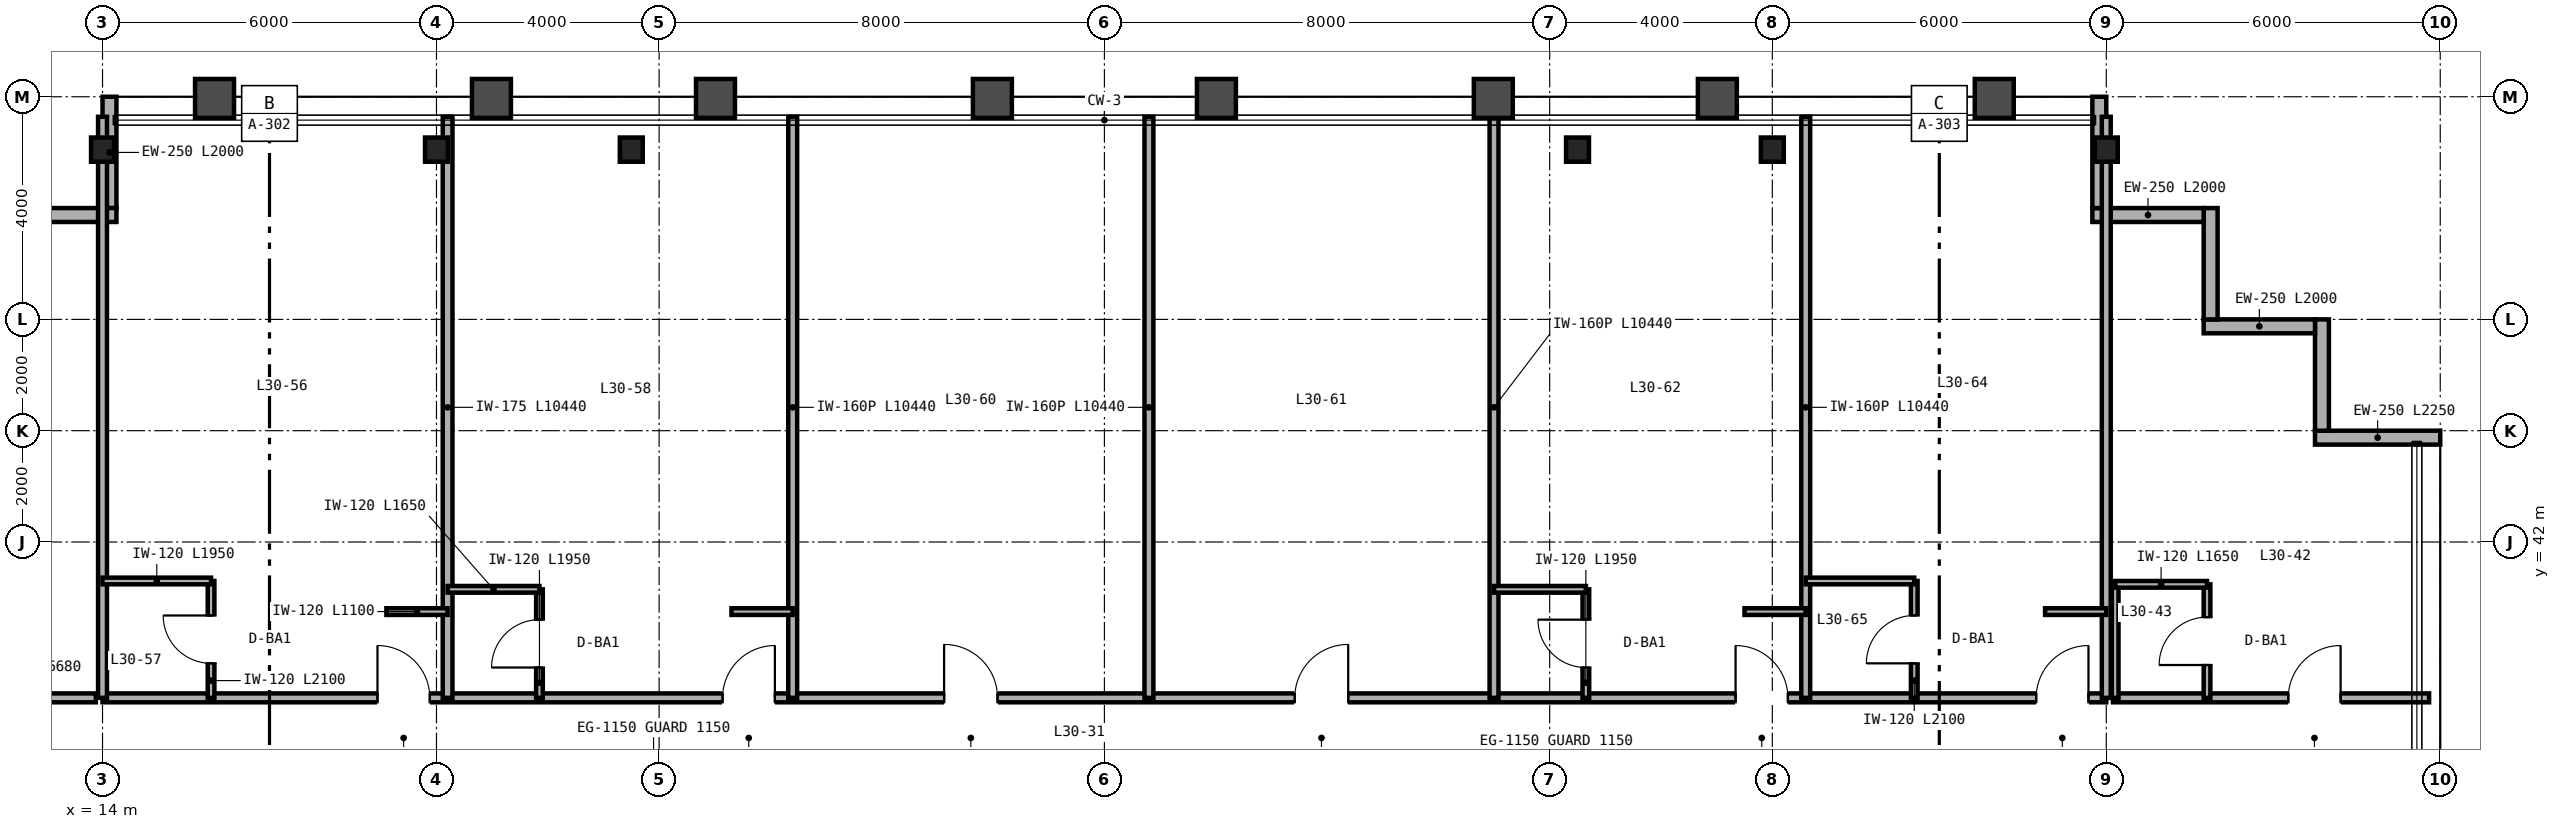
"""IFC4 building model, lengths in metres.
Left out: names, types, materials, properties, quantities, classifications, styles, units other than length and angle.
Written with IfcOpenShell. Run it as: python <this file> out.ifc"""

import sys

from ifc_helpers import new_model, si_unit, direction, frame, frame_2d, origin, origin_2d, place, context, subcontext, project, spatial, rectangle, i_section, extrude, source, transform, mapped, element, fill, save


model = new_model("IFC4")
c1 = context("Model", 3, precision=1e-05, world=origin(), true_north=direction((0.0, 1.0)))
c2 = subcontext(c1, "Body", "Model", "MODEL_VIEW")
j1 = project(units=[si_unit("LENGTHUNIT", "METRE"), si_unit("PLANEANGLEUNIT", "RADIAN")], contexts=[c1])
p1 = place(None, origin())
s1 = spatial("IfcSite", under=j1, at=p1, CompositionType="ELEMENT")
p2 = place(p1, origin())
s2 = spatial("IfcBuilding", under=s1, at=p2, CompositionType="ELEMENT")
p3 = place(p2, frame((0.0, 0.0, 122.4)))
s3 = spatial("IfcBuildingStorey", under=s2, at=p3, CompositionType="ELEMENT", Elevation=122.4)
m1 = source(origin(), c2, "Body", "SweptSolid", [
    extrude(i_section(OverallWidth=0.412, OverallDepth=0.435, WebThickness=0.036, FlangeThickness=0.057, FilletRadius=0.025, at=origin_2d()), origin(), (0.0, 0.0, 1.0), 3.36),
])
for number, where, z_axis, x_axis in (
    (1, (14.0, 49.05, 0.0), (0.0, 0.0, 1.0), (1.0, 0.0, 0.0)),
    (2, (20.0, 49.05, 0.0), (0.0, 0.0, 1.0), (1.0, 0.0, 0.0)),
    (3, (23.5, 49.05, 0.0), (0.0, 0.0, 1.0), (1.0, 0.0, 0.0)),
    (4, (40.5, 49.05, 0.0), (0.0, 0.0, 1.0), (1.0, 0.0, 0.0)),
    (5, (44.0, 49.05, 0.0), (0.0, 0.0, 1.0), (1.0, 0.0, 0.0)),
    (6, (50.0, 49.05, 0.0), (0.0, 0.0, 1.0), (1.0, 0.0, 0.0)),
):
    element("IfcColumn", number, at=place(p3, frame(where, z_axis=z_axis, x_axis=x_axis)), inside=s3, PredefinedType="COLUMN", context=c2, shape_type="MappedRepresentation", body=[
        mapped(m1, transform((0.0, 0.0, 0.0), scale=1.0)),
    ])
p4 = place(p3, frame((56.0, 43.875, 0.0), z_axis=(0.0, 0.0, 1.0), x_axis=(-1.0, 0.0, 0.0)))
e7 = element("IfcWall", 7, at=p4, inside=s3, PredefinedType="SOLIDWALL", context=c2, shape_type="SweptSolid", body=[
    extrude(rectangle(XDim=2.25, YDim=0.25, at=frame_2d((1.125, 0.0))), origin(), (0.0, 0.0, 1.0), 3.36),
])
for number, where, z_axis, x_axis in (
    (8, (53.875, 44.0, 0.0), (0.0, 0.0, 1.0), (0.0, 1.0, 0.0)),
    (9, (53.75, 45.875, 0.0), (0.0, 0.0, 1.0), (-1.0, 0.0, 0.0)),
    (10, (51.875, 46.0, 0.0), (0.0, 0.0, 1.0), (0.0, 1.0, 0.0)),
    (11, (51.75, 47.875, 0.0), (0.0, 0.0, 1.0), (-1.0, 0.0, 0.0)),
):
    element("IfcWall", number, at=place(p3, frame(where, z_axis=z_axis, x_axis=x_axis)), inside=s3, PredefinedType="SOLIDWALL", context=c2, shape_type="SweptSolid", body=[
        extrude(rectangle(XDim=2.0, YDim=0.25, at=frame_2d((1.0, 0.0))), origin(), (0.0, 0.0, 1.0), 3.36),
    ])
for number, where, z_axis, x_axis in (
    (12, (49.875, 48.0, 0.0), (0.0, 0.0, 1.0), (0.0, 1.0, 0.0)),
    (13, (14.125, 50.0, 0.0), (0.0, 0.0, 1.0), (0.0, -1.0, 0.0)),
):
    element("IfcWall", number, at=place(p3, frame(where, z_axis=z_axis, x_axis=x_axis)), inside=s3, PredefinedType="SOLIDWALL", context=c2, shape_type="SweptSolid", body=[
        extrude(rectangle(XDim=2.0, YDim=0.25, at=frame_2d((1.0, 0.0))), origin(), (0.0, 0.0, 1.0), 2.667),
    ])
p5 = place(p3, frame((14.25, 47.875, 0.0), z_axis=(0.0, 0.0, 1.0), x_axis=(-1.0, 0.0, 0.0)))
e14 = element("IfcWall", 14, at=p5, inside=s3, PredefinedType="SOLIDWALL", context=c2, shape_type="SweptSolid", body=[
    extrude(rectangle(XDim=2.0, YDim=0.25, at=frame_2d((1.0, 0.0))), origin(), (0.0, 0.0, 1.0), 3.36),
])
p6 = place(p3, frame((8.2, 39.2, 0.0), z_axis=(0.0, 0.0, 1.0), x_axis=(1.0, 0.0, 0.0)))
e15 = element("IfcWall", 15, at=p6, inside=s3, PredefinedType="PARTITIONING", context=c2, shape_type="SweptSolid", body=[
    extrude(rectangle(XDim=5.68, YDim=0.16, at=frame_2d((2.84, 0.0))), origin(), (0.0, 0.0, 1.0), 3.36),
])
p7 = place(p6, frame((2.36, 0.0, 0.0)))
e16 = element("IfcOpeningElement", 16, at=p7, cuts=e15, PredefinedType="OPENING", context=c2, shape_type="SweptSolid", body=[
    extrude(rectangle(XDim=0.96, YDim=2.15, at=frame_2d((0.48, 1.075))), frame((0.0, 0.09, 0.0), z_axis=(0.0, -1.0, 0.0), x_axis=(1.0, 0.0, 0.0)), (0.0, 0.0, 1.0), 0.18),
])
p8 = place(p3, frame((50.12, 39.2, 0.0), z_axis=(0.0, 0.0, 1.0), x_axis=(1.0, 0.0, 0.0)))
e17 = element("IfcWall", 17, at=p8, inside=s3, PredefinedType="PARTITIONING", context=c2, shape_type="SweptSolid", body=[
    extrude(rectangle(XDim=5.68, YDim=0.16, at=frame_2d((2.84, 0.0))), origin(), (0.0, 0.0, 1.0), 3.36),
])
p9 = place(p8, frame((3.15, 0.0, 0.0)))
e18 = element("IfcOpeningElement", 18, at=p9, cuts=e17, PredefinedType="OPENING", context=c2, shape_type="SweptSolid", body=[
    extrude(rectangle(XDim=0.94, YDim=2.15, at=frame_2d((0.47, 1.075))), frame((0.0, 0.09, 0.0), z_axis=(0.0, -1.0, 0.0), x_axis=(1.0, 0.0, 0.0)), (0.0, 0.0, 1.0), 0.18),
])
p10 = place(p3, frame((51.81, 39.2, 0.0), z_axis=(0.0, 0.0, 1.0), x_axis=(0.0, 1.0, 0.0)))
e19 = element("IfcWall", 19, at=p10, inside=s3, PredefinedType="PARTITIONING", context=c2, shape_type="SweptSolid", body=[
    extrude(rectangle(XDim=2.04, YDim=0.12, at=frame_2d((1.02, 0.0))), origin(), (0.0, 0.0, 1.0), 3.36),
])
p11 = place(p10, frame((0.59, 0.0, 0.0)))
e20 = element("IfcOpeningElement", 20, at=p11, cuts=e19, PredefinedType="OPENING", context=c2, shape_type="SweptSolid", body=[
    extrude(rectangle(XDim=0.86, YDim=2.1, at=frame_2d((0.43, 1.05))), frame((0.0, 0.07, 0.0), z_axis=(0.0, -1.0, 0.0), x_axis=(1.0, 0.0, 0.0)), (0.0, 0.0, 1.0), 0.14),
])
p12 = place(p3, frame((50.16, 39.2, 0.0), z_axis=(0.0, 0.0, 1.0), x_axis=(0.0, 1.0, 0.0)))
e21 = element("IfcWall", 21, at=p12, inside=s3, PredefinedType="PARTITIONING", context=c2, shape_type="SweptSolid", body=[
    extrude(rectangle(XDim=2.04, YDim=0.12, at=frame_2d((1.02, 0.0))), origin(), (0.0, 0.0, 1.0), 3.36),
])
p13 = place(p3, frame((50.16, 41.24, 0.0), z_axis=(0.0, 0.0, 1.0), x_axis=(1.0, 0.0, 0.0)))
e22 = element("IfcWall", 22, at=p13, inside=s3, PredefinedType="PARTITIONING", context=c2, shape_type="SweptSolid", body=[
    extrude(rectangle(XDim=1.65, YDim=0.12, at=frame_2d((0.825, 0.0))), origin(), (0.0, 0.0, 1.0), 3.36),
])
p14 = place(p3, frame((14.0, 39.2, 0.0), z_axis=(0.0, 0.0, 1.0), x_axis=(1.0, 0.0, 0.0)))
e23 = element("IfcWall", 23, at=p14, inside=s3, PredefinedType="PARTITIONING", context=c2, shape_type="SweptSolid", body=[
    extrude(rectangle(XDim=36.0, YDim=0.16, at=frame_2d((18.0, 0.0))), origin(), (0.0, 0.0, 1.0), 2.581),
])
p15 = place(p14, frame((4.94, 0.0, 0.0)))
e24 = element("IfcOpeningElement", 24, at=p15, cuts=e23, PredefinedType="OPENING", context=c2, shape_type="SweptSolid", body=[
    extrude(rectangle(XDim=0.94, YDim=2.15, at=frame_2d((0.47, 1.075))), frame((0.0, 0.09, 0.0), z_axis=(0.0, -1.0, 0.0), x_axis=(1.0, 0.0, 0.0)), (0.0, 0.0, 1.0), 0.18),
])
p16 = place(p14, frame((11.14, 0.0, 0.0)))
e25 = element("IfcOpeningElement", 25, at=p16, cuts=e23, PredefinedType="OPENING", context=c2, shape_type="SweptSolid", body=[
    extrude(rectangle(XDim=0.94, YDim=2.15, at=frame_2d((0.47, 1.075))), frame((0.0, 0.09, 0.0), z_axis=(0.0, -1.0, 0.0), x_axis=(1.0, 0.0, 0.0)), (0.0, 0.0, 1.0), 0.18),
])
p17 = place(p14, frame((15.12, 0.0, 0.0)))
e26 = element("IfcOpeningElement", 26, at=p17, cuts=e23, PredefinedType="OPENING", context=c2, shape_type="SweptSolid", body=[
    extrude(rectangle(XDim=0.96, YDim=2.15, at=frame_2d((0.48, 1.075))), frame((0.0, 0.09, 0.0), z_axis=(0.0, -1.0, 0.0), x_axis=(1.0, 0.0, 0.0)), (0.0, 0.0, 1.0), 0.18),
])
p18 = place(p14, frame((21.42, 0.0, 0.0)))
e27 = element("IfcOpeningElement", 27, at=p18, cuts=e23, PredefinedType="OPENING", context=c2, shape_type="SweptSolid", body=[
    extrude(rectangle(XDim=0.96, YDim=2.15, at=frame_2d((0.48, 1.075))), frame((0.0, 0.09, 0.0), z_axis=(0.0, -1.0, 0.0), x_axis=(1.0, 0.0, 0.0)), (0.0, 0.0, 1.0), 0.18),
])
p19 = place(p14, frame((29.34, 0.0, 0.0)))
e28 = element("IfcOpeningElement", 28, at=p19, cuts=e23, PredefinedType="OPENING", context=c2, shape_type="SweptSolid", body=[
    extrude(rectangle(XDim=0.94, YDim=2.15, at=frame_2d((0.47, 1.075))), frame((0.0, 0.09, 0.0), z_axis=(0.0, -1.0, 0.0), x_axis=(1.0, 0.0, 0.0)), (0.0, 0.0, 1.0), 0.18),
])
p20 = place(p14, frame((34.74, 0.0, 0.0)))
e29 = element("IfcOpeningElement", 29, at=p20, cuts=e23, PredefinedType="OPENING", context=c2, shape_type="SweptSolid", body=[
    extrude(rectangle(XDim=0.94, YDim=2.15, at=frame_2d((0.47, 1.075))), frame((0.0, 0.09, 0.0), z_axis=(0.0, -1.0, 0.0), x_axis=(1.0, 0.0, 0.0)), (0.0, 0.0, 1.0), 0.18),
])
for number, where, z_axis, x_axis in (
    (30, (14.0, 39.2, 0.0), (0.0, 0.0, 1.0), (0.0, 1.0, 0.0)),
    (31, (50.0, 39.2, 0.0), (0.0, 0.0, 1.0), (0.0, 1.0, 0.0)),
):
    element("IfcWall", number, at=place(p3, frame(where, z_axis=z_axis, x_axis=x_axis)), inside=s3, PredefinedType="PARTITIONING", context=c2, shape_type="SweptSolid", body=[
        extrude(rectangle(XDim=10.44, YDim=0.16, at=frame_2d((5.22, 0.0))), origin(), (0.0, 0.0, 1.0), 2.667),
    ])
p21 = place(p3, frame((20.2, 39.2, 0.0), z_axis=(0.0, 0.0, 1.0), x_axis=(0.0, 1.0, 0.0)))
e32 = element("IfcWall", 32, at=p21, inside=s3, PredefinedType="PARTITIONING", context=c2, shape_type="SweptSolid", body=[
    extrude(rectangle(XDim=10.44, YDim=0.175, at=frame_2d((5.22, 0.0))), origin(), (0.0, 0.0, 1.0), 2.667),
])
p22 = place(p3, frame((15.95, 39.2, 0.0), z_axis=(0.0, 0.0, 1.0), x_axis=(0.0, 1.0, 0.0)))
e33 = element("IfcWall", 33, at=p22, inside=s3, PredefinedType="PARTITIONING", context=c2, shape_type="SweptSolid", body=[
    extrude(rectangle(XDim=2.1, YDim=0.12, at=frame_2d((1.05, 0.0))), origin(), (0.0, 0.0, 1.0), 3.36),
])
p23 = place(p22, frame((0.62, 0.0, 0.0)))
e34 = element("IfcOpeningElement", 34, at=p23, cuts=e33, PredefinedType="OPENING", context=c2, shape_type="SweptSolid", body=[
    extrude(rectangle(XDim=0.86, YDim=2.1, at=frame_2d((0.43, 1.05))), frame((0.0, 0.07, 0.0), z_axis=(0.0, -1.0, 0.0), x_axis=(1.0, 0.0, 0.0)), (0.0, 0.0, 1.0), 0.14),
])
p24 = place(p3, frame((14.0, 41.3, 0.0), z_axis=(0.0, 0.0, 1.0), x_axis=(1.0, 0.0, 0.0)))
e35 = element("IfcWall", 35, at=p24, inside=s3, PredefinedType="PARTITIONING", context=c2, shape_type="SweptSolid", body=[
    extrude(rectangle(XDim=1.95, YDim=0.12, at=frame_2d((0.975, 0.0))), origin(), (0.0, 0.0, 1.0), 3.36),
])
p25 = place(p3, frame((19.1, 40.75, 0.0), z_axis=(0.0, 0.0, 1.0), x_axis=(1.0, 0.0, 0.0)))
e36 = element("IfcWall", 36, at=p25, inside=s3, PredefinedType="PARTITIONING", context=c2, shape_type="SweptSolid", body=[
    extrude(rectangle(XDim=1.1, YDim=0.12, at=frame_2d((0.55, 0.0))), origin(), (0.0, 0.0, 1.0), 3.36),
])
p26 = place(p3, frame((26.4, 39.2, 0.0), z_axis=(0.0, 0.0, 1.0), x_axis=(0.0, 1.0, 0.0)))
e37 = element("IfcWall", 37, at=p26, inside=s3, PredefinedType="PARTITIONING", context=c2, shape_type="SweptSolid", body=[
    extrude(rectangle(XDim=10.44, YDim=0.16, at=frame_2d((5.22, 0.0))), origin(), (0.0, 0.0, 1.0), 2.433),
])
p27 = place(p3, frame((21.85, 39.2, 0.0), z_axis=(0.0, 0.0, 1.0), x_axis=(0.0, 1.0, 0.0)))
e38 = element("IfcWall", 38, at=p27, inside=s3, PredefinedType="PARTITIONING", context=c2, shape_type="SweptSolid", body=[
    extrude(rectangle(XDim=1.95, YDim=0.12, at=frame_2d((0.975, 0.0))), origin(), (0.0, 0.0, 1.0), 3.36),
])
p28 = place(p27, frame((0.545, 0.0, 0.0)))
e39 = element("IfcOpeningElement", 39, at=p28, cuts=e38, PredefinedType="OPENING", context=c2, shape_type="SweptSolid", body=[
    extrude(rectangle(XDim=0.86, YDim=2.1, at=frame_2d((0.43, 1.05))), frame((0.0, 0.07, 0.0), z_axis=(0.0, -1.0, 0.0), x_axis=(1.0, 0.0, 0.0)), (0.0, 0.0, 1.0), 0.14),
])
p29 = place(p3, frame((20.2, 41.15, 0.0), z_axis=(0.0, 0.0, 1.0), x_axis=(1.0, 0.0, 0.0)))
e40 = element("IfcWall", 40, at=p29, inside=s3, PredefinedType="PARTITIONING", context=c2, shape_type="SweptSolid", body=[
    extrude(rectangle(XDim=1.65, YDim=0.12, at=frame_2d((0.825, 0.0))), origin(), (0.0, 0.0, 1.0), 3.36),
])
p30 = place(p3, frame((25.3, 40.75, 0.0), z_axis=(0.0, 0.0, 1.0), x_axis=(1.0, 0.0, 0.0)))
e41 = element("IfcWall", 41, at=p30, inside=s3, PredefinedType="PARTITIONING", context=c2, shape_type="SweptSolid", body=[
    extrude(rectangle(XDim=1.1, YDim=0.12, at=frame_2d((0.55, 0.0))), origin(), (0.0, 0.0, 1.0), 3.36),
])
for number, where, z_axis, x_axis in (
    (42, (32.8, 39.2, 0.0), (0.0, 0.0, 1.0), (0.0, 1.0, 0.0)),
    (43, (39.0, 39.2, 0.0), (0.0, 0.0, 1.0), (0.0, 1.0, 0.0)),
):
    element("IfcWall", number, at=place(p3, frame(where, z_axis=z_axis, x_axis=x_axis)), inside=s3, PredefinedType="PARTITIONING", context=c2, shape_type="SweptSolid", body=[
        extrude(rectangle(XDim=10.44, YDim=0.16, at=frame_2d((5.22, 0.0))), origin(), (0.0, 0.0, 1.0), 2.433),
    ])
p31 = place(p3, frame((44.6, 39.2, 0.0), z_axis=(0.0, 0.0, 1.0), x_axis=(0.0, 1.0, 0.0)))
e44 = element("IfcWall", 44, at=p31, inside=s3, PredefinedType="PARTITIONING", context=c2, shape_type="SweptSolid", body=[
    extrude(rectangle(XDim=10.44, YDim=0.16, at=frame_2d((5.22, 0.0))), origin(), (0.0, 0.0, 1.0), 2.667),
])
p32 = place(p3, frame((40.65, 39.2, 0.0), z_axis=(0.0, 0.0, 1.0), x_axis=(0.0, 1.0, 0.0)))
e45 = element("IfcWall", 45, at=p32, inside=s3, PredefinedType="PARTITIONING", context=c2, shape_type="SweptSolid", body=[
    extrude(rectangle(XDim=1.95, YDim=0.12, at=frame_2d((0.975, 0.0))), origin(), (0.0, 0.0, 1.0), 2.581),
])
p33 = place(p32, frame((0.545, 0.0, 0.0)))
e46 = element("IfcOpeningElement", 46, at=p33, cuts=e45, PredefinedType="OPENING", context=c2, shape_type="SweptSolid", body=[
    extrude(rectangle(XDim=0.86, YDim=2.1, at=frame_2d((0.43, 1.05))), frame((0.0, 0.07, 0.0), z_axis=(0.0, -1.0, 0.0), x_axis=(1.0, 0.0, 0.0)), (0.0, 0.0, 1.0), 0.14),
])
p34 = place(p3, frame((39.0, 41.15, 0.0), z_axis=(0.0, 0.0, 1.0), x_axis=(1.0, 0.0, 0.0)))
e47 = element("IfcWall", 47, at=p34, inside=s3, PredefinedType="PARTITIONING", context=c2, shape_type="SweptSolid", body=[
    extrude(rectangle(XDim=1.65, YDim=0.12, at=frame_2d((0.825, 0.0))), origin(), (0.0, 0.0, 1.0), 2.581),
])
p35 = place(p3, frame((43.5, 40.75, 0.0), z_axis=(0.0, 0.0, 1.0), x_axis=(1.0, 0.0, 0.0)))
e48 = element("IfcWall", 48, at=p35, inside=s3, PredefinedType="PARTITIONING", context=c2, shape_type="SweptSolid", body=[
    extrude(rectangle(XDim=1.1, YDim=0.12, at=frame_2d((0.55, 0.0))), origin(), (0.0, 0.0, 1.0), 3.36),
])
p36 = place(p3, frame((46.55, 39.2, 0.0), z_axis=(0.0, 0.0, 1.0), x_axis=(0.0, 1.0, 0.0)))
e49 = element("IfcWall", 49, at=p36, inside=s3, PredefinedType="PARTITIONING", context=c2, shape_type="SweptSolid", body=[
    extrude(rectangle(XDim=2.1, YDim=0.12, at=frame_2d((1.05, 0.0))), origin(), (0.0, 0.0, 1.0), 3.36),
])
p37 = place(p36, frame((0.62, 0.0, 0.0)))
e50 = element("IfcOpeningElement", 50, at=p37, cuts=e49, PredefinedType="OPENING", context=c2, shape_type="SweptSolid", body=[
    extrude(rectangle(XDim=0.86, YDim=2.1, at=frame_2d((0.43, 1.05))), frame((0.0, 0.07, 0.0), z_axis=(0.0, -1.0, 0.0), x_axis=(1.0, 0.0, 0.0)), (0.0, 0.0, 1.0), 0.14),
])
p38 = place(p3, frame((44.6, 41.3, 0.0), z_axis=(0.0, 0.0, 1.0), x_axis=(1.0, 0.0, 0.0)))
e51 = element("IfcWall", 51, at=p38, inside=s3, PredefinedType="PARTITIONING", context=c2, shape_type="SweptSolid", body=[
    extrude(rectangle(XDim=1.95, YDim=0.12, at=frame_2d((0.975, 0.0))), origin(), (0.0, 0.0, 1.0), 3.36),
])
p39 = place(p3, frame((48.9, 40.75, 0.0), z_axis=(0.0, 0.0, 1.0), x_axis=(1.0, 0.0, 0.0)))
e52 = element("IfcWall", 52, at=p39, inside=s3, PredefinedType="PARTITIONING", context=c2, shape_type="SweptSolid", body=[
    extrude(rectangle(XDim=1.1, YDim=0.12, at=frame_2d((0.55, 0.0))), origin(), (0.0, 0.0, 1.0), 3.36),
])
m2 = source(origin(), c2, "Body", "SweptSolid", [
    extrude(rectangle(XDim=0.86, YDim=2.1, at=frame_2d((0.43, 1.05))), frame((0.0, 0.025, 0.0), z_axis=(0.0, -1.0, 0.0), x_axis=(1.0, 0.0, 0.0)), (0.0, 0.0, 1.0), 0.05),
])
p40 = place(p11, origin())
e53 = element("IfcDoor", 53, at=p40, inside=s3, OperationType="SINGLE_SWING_LEFT", PredefinedType="DOOR", context=c2, shape_type="MappedRepresentation", body=[
    mapped(m2, transform((0.0, 0.0, 0.0), scale=1.0)),
])
fill(e20, e53)
m3 = source(origin(), c2, "Body", "SweptSolid", [
    extrude(rectangle(XDim=0.94, YDim=2.15, at=frame_2d((0.47, 1.075))), frame((0.0, 0.025, 0.0), z_axis=(0.0, -1.0, 0.0), x_axis=(1.0, 0.0, 0.0)), (0.0, 0.0, 1.0), 0.05),
])
p41 = place(p9, origin())
e54 = element("IfcDoor", 54, at=p41, inside=s3, OperationType="SINGLE_SWING_RIGHT", PredefinedType="DOOR", context=c2, shape_type="MappedRepresentation", body=[
    mapped(m3, transform((0.0, 0.0, 0.0), scale=1.0)),
])
fill(e18, e54)
p42 = place(p23, origin())
e55 = element("IfcDoor", 55, at=p42, inside=s3, OperationType="SINGLE_SWING_RIGHT", PredefinedType="DOOR", context=c2, shape_type="MappedRepresentation", body=[
    mapped(m2, transform((0.0, 0.0, 0.0), scale=1.0)),
])
fill(e34, e55)
p43 = place(p28, origin())
e56 = element("IfcDoor", 56, at=p43, inside=s3, OperationType="SINGLE_SWING_LEFT", PredefinedType="DOOR", context=c2, shape_type="MappedRepresentation", body=[
    mapped(m2, transform((0.0, 0.0, 0.0), scale=1.0)),
])
fill(e39, e56)
p44 = place(p33, origin())
e57 = element("IfcDoor", 57, at=p44, inside=s3, OperationType="SINGLE_SWING_RIGHT", PredefinedType="DOOR", context=c2, shape_type="MappedRepresentation", body=[
    mapped(m2, transform((0.0, 0.0, 0.0), scale=1.0)),
])
fill(e46, e57)
p45 = place(p37, origin())
e58 = element("IfcDoor", 58, at=p45, inside=s3, OperationType="SINGLE_SWING_LEFT", PredefinedType="DOOR", context=c2, shape_type="MappedRepresentation", body=[
    mapped(m2, transform((0.0, 0.0, 0.0), scale=1.0)),
])
fill(e50, e58)
p46 = place(p15, origin())
e59 = element("IfcDoor", 59, at=p46, inside=s3, OperationType="SINGLE_SWING_LEFT", PredefinedType="DOOR", context=c2, shape_type="MappedRepresentation", body=[
    mapped(m3, transform((0.0, 0.0, 0.0), scale=1.0)),
])
fill(e24, e59)
p47 = place(p16, origin())
e60 = element("IfcDoor", 60, at=p47, inside=s3, OperationType="SINGLE_SWING_RIGHT", PredefinedType="DOOR", context=c2, shape_type="MappedRepresentation", body=[
    mapped(m3, transform((0.0, 0.0, 0.0), scale=1.0)),
])
fill(e25, e60)
m4 = source(origin(), c2, "Body", "SweptSolid", [
    extrude(rectangle(XDim=0.96, YDim=2.15, at=frame_2d((0.48, 1.075))), frame((0.0, 0.025, 0.0), z_axis=(0.0, -1.0, 0.0), x_axis=(1.0, 0.0, 0.0)), (0.0, 0.0, 1.0), 0.05),
])
p48 = place(p17, origin())
e61 = element("IfcDoor", 61, at=p48, inside=s3, OperationType="SINGLE_SWING_LEFT", PredefinedType="DOOR", context=c2, shape_type="MappedRepresentation", body=[
    mapped(m4, transform((0.0, 0.0, 0.0), scale=1.0)),
])
fill(e26, e61)
p49 = place(p18, origin())
e62 = element("IfcDoor", 62, at=p49, inside=s3, OperationType="SINGLE_SWING_RIGHT", PredefinedType="DOOR", context=c2, shape_type="MappedRepresentation", body=[
    mapped(m4, transform((0.0, 0.0, 0.0), scale=1.0)),
])
fill(e27, e62)
p50 = place(p19, origin())
e63 = element("IfcDoor", 63, at=p50, inside=s3, OperationType="SINGLE_SWING_LEFT", PredefinedType="DOOR", context=c2, shape_type="MappedRepresentation", body=[
    mapped(m3, transform((0.0, 0.0, 0.0), scale=1.0)),
])
fill(e28, e63)
p51 = place(p20, origin())
e64 = element("IfcDoor", 64, at=p51, inside=s3, OperationType="SINGLE_SWING_RIGHT", PredefinedType="DOOR", context=c2, shape_type="MappedRepresentation", body=[
    mapped(m3, transform((0.0, 0.0, 0.0), scale=1.0)),
])
fill(e29, e64)
save(model, sys.argv[1])
